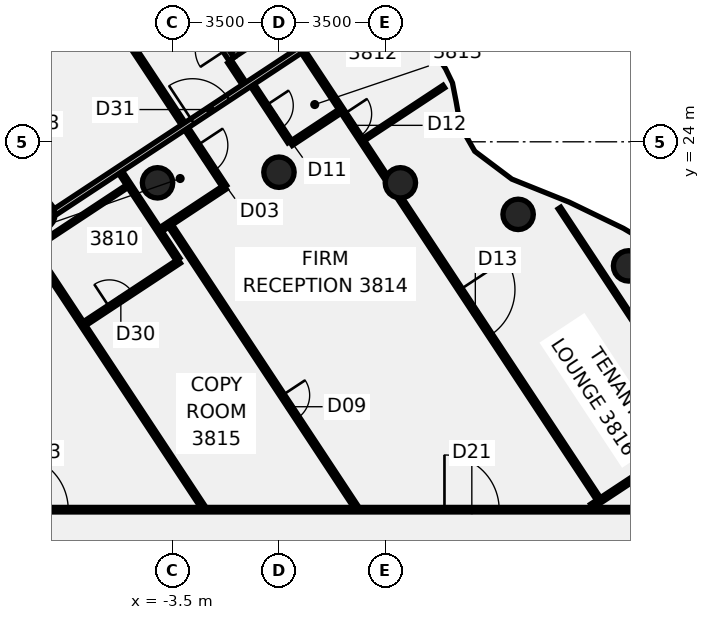
"""IFC4 building model, lengths in metres.
Left out: names, types, materials, properties, quantities, classifications, styles, units other than length and angle.
Written with IfcOpenShell. Run it as: python <this file> out.ifc"""

import sys

from ifc_helpers import new_model, si_unit, direction, frame, frame_2d, origin, origin_2d, place, context, subcontext, project, spatial, rectangle, circle, extrude, element, fill, save


model = new_model("IFC4")
c1 = context("Model", 3, precision=1e-05, world=origin(), true_north=direction((0.0, 1.0)))
c2 = subcontext(c1, "Body", "Model", "MODEL_VIEW")
j1 = project(units=[si_unit("LENGTHUNIT", "METRE"), si_unit("PLANEANGLEUNIT", "RADIAN")], contexts=[c1])
p1 = place(None, origin())
s1 = spatial("IfcSite", under=j1, at=p1, CompositionType="ELEMENT")
p2 = place(p1, origin())
s2 = spatial("IfcBuilding", under=s1, at=p2, CompositionType="ELEMENT")
p3 = place(p2, frame((0.0, 0.0, 155.5)))
s3 = spatial("IfcBuildingStorey", under=s2, at=p3, CompositionType="ELEMENT", Elevation=155.5)
for number, where, z_axis, x_axis in (
    (1, (11.5, 19.919, -0.14), (0.0, 0.0, 1.0), (1.0, 0.0, 0.0)),
    (2, (7.866, 21.613, -0.14), (0.0, 0.0, 1.0), (1.0, 0.0, 0.0)),
    (3, (3.994, 22.651, -0.14), (0.0, 0.0, 1.0), (1.0, 0.0, 0.0)),
    (4, (0.0, 23.0, -0.14), (0.0, 0.0, 1.0), (1.0, 0.0, 0.0)),
    (5, (-3.994, 22.651, -0.14), (0.0, 0.0, 1.0), (1.0, 0.0, 0.0)),
    (6, (-7.866, 21.613, -0.14), (0.0, 0.0, 1.0), (1.0, 0.0, 0.0)),
):
    element("IfcColumn", number, at=place(p3, frame(where, z_axis=z_axis, x_axis=x_axis)), inside=s3, PredefinedType="COLUMN", context=c2, shape_type="SweptSolid", body=[
        extrude(circle(Radius=0.5, at=origin_2d()), origin(), (0.0, 0.0, 1.0), 3.75),
    ])
p4 = place(p3, frame((-12.969, 39.464, 0.0), z_axis=(0.0, 0.0, 1.0), x_axis=(0.551034040248, -0.834482765842, 0.0)))
e7 = element("IfcWall", 7, at=p4, inside=s3, PredefinedType="PARTITIONING", context=c2, shape_type="SweptSolid", body=[
    extrude(rectangle(XDim=20.3, YDim=0.15, at=frame_2d((10.15, 0.0))), origin(), (0.0, 0.0, 1.0), 3.01),
])
p5 = place(p4, frame((18.67, 0.0, 0.0)))
e8 = element("IfcOpeningElement", 8, at=p5, cuts=e7, PredefinedType="OPENING", context=c2, shape_type="SweptSolid", body=[
    extrude(rectangle(XDim=1.0, YDim=2.1, at=frame_2d((0.5, 1.05))), frame((0.0, 0.085, 0.0), z_axis=(0.0, -1.0, 0.0), x_axis=(1.0, 0.0, 0.0)), (0.0, 0.0, 1.0), 0.17),
])
p6 = place(p4, frame((11.77, 0.0, 0.0)))
e9 = element("IfcOpeningElement", 9, at=p6, cuts=e7, PredefinedType="OPENING", context=c2, shape_type="SweptSolid", body=[
    extrude(rectangle(XDim=0.9, YDim=2.1, at=frame_2d((0.45, 1.05))), frame((0.0, 0.085, 0.0), z_axis=(0.0, -1.0, 0.0), x_axis=(1.0, 0.0, 0.0)), (0.0, 0.0, 1.0), 0.17),
])
p7 = place(p4, frame((5.17, 0.0, 0.0)))
e10 = element("IfcOpeningElement", 10, at=p7, cuts=e7, PredefinedType="OPENING", context=c2, shape_type="SweptSolid", body=[
    extrude(rectangle(XDim=0.9, YDim=2.1, at=frame_2d((0.45, 1.05))), frame((0.0, 0.085, 0.0), z_axis=(0.0, -1.0, 0.0), x_axis=(1.0, 0.0, 0.0)), (0.0, 0.0, 1.0), 0.17),
])
p8 = place(p3, frame((-1.622, 26.634, 0.0), z_axis=(0.0, 0.0, 1.0), x_axis=(0.551095072223, -0.83444246139, 0.0)))
e11 = element("IfcWall", 11, at=p8, inside=s3, PredefinedType="PARTITIONING", context=c2, shape_type="SweptSolid", body=[
    extrude(rectangle(XDim=0.861, YDim=0.15, at=frame_2d((0.43, 0.0))), origin(), (0.0, 0.0, 1.0), 3.01),
])
p9 = place(p3, frame((-9.884, 23.177, 0.0), z_axis=(0.0, 0.0, 1.0), x_axis=(0.550963337995, -0.834529448363, 0.0)))
e12 = element("IfcWall", 12, at=p9, inside=s3, PredefinedType="PARTITIONING", context=c2, shape_type="SweptSolid", body=[
    extrude(rectangle(XDim=13.393, YDim=0.15, at=frame_2d((6.697, 0.0))), origin(), (0.0, 0.0, 1.0), 3.01),
])
p10 = place(p3, frame((-5.21, 22.995, 0.0), z_axis=(0.0, 0.0, 1.0), x_axis=(0.550928577868, -0.834552396251, 0.0)))
e13 = element("IfcWall", 13, at=p10, inside=s3, PredefinedType="PARTITIONING", context=c2, shape_type="SweptSolid", body=[
    extrude(rectangle(XDim=3.426, YDim=0.15, at=frame_2d((1.713, 0.0))), origin(), (0.0, 0.0, 1.0), 3.01),
])
p11 = place(p3, frame((-3.565, 21.228, 0.0), z_axis=(0.0, 0.0, 1.0), x_axis=(0.55097538213, -0.834521496599, 0.0)))
e14 = element("IfcWall", 14, at=p11, inside=s3, PredefinedType="PARTITIONING", context=c2, shape_type="SweptSolid", body=[
    extrude(rectangle(XDim=11.058, YDim=0.15, at=frame_2d((5.529, 0.0))), origin(), (0.0, 0.0, 1.0), 3.01),
])
p12 = place(p11, frame((6.67, 0.0, 0.0)))
e15 = element("IfcOpeningElement", 15, at=p12, cuts=e14, PredefinedType="OPENING", context=c2, shape_type="SweptSolid", body=[
    extrude(rectangle(XDim=0.9, YDim=2.1, at=frame_2d((0.45, 1.05))), frame((0.0, 0.085, 0.0), z_axis=(0.0, -1.0, 0.0), x_axis=(1.0, 0.0, 0.0)), (0.0, 0.0, 1.0), 0.17),
])
p13 = place(p3, frame((-0.867, 25.855, 0.0), z_axis=(0.0, 0.0, 1.0), x_axis=(0.550802281657, -0.834635756795, 0.0)))
e16 = element("IfcWall", 16, at=p13, inside=s3, PredefinedType="PARTITIONING", context=c2, shape_type="SweptSolid", body=[
    extrude(rectangle(XDim=2.215, YDim=0.15, at=frame_2d((1.107, 0.0))), origin(), (0.0, 0.0, 1.0), 3.01),
])
p14 = place(p13, frame((0.795, 0.0, 0.0)))
e17 = element("IfcOpeningElement", 17, at=p14, cuts=e16, PredefinedType="OPENING", context=c2, shape_type="SweptSolid", body=[
    extrude(rectangle(XDim=0.9, YDim=2.1, at=frame_2d((0.45, 1.05))), frame((0.0, 0.085, 0.0), z_axis=(0.0, -1.0, 0.0), x_axis=(1.0, 0.0, 0.0)), (0.0, 0.0, 1.0), 0.17),
])
p15 = place(p3, frame((0.799, 26.961, 0.0), z_axis=(0.0, 0.0, 1.0), x_axis=(0.55102221272, -0.834490575794, 0.0)))
e18 = element("IfcWall", 18, at=p15, inside=s3, PredefinedType="PARTITIONING", context=c2, shape_type="SweptSolid", body=[
    extrude(rectangle(XDim=5.139, YDim=0.15, at=frame_2d((2.57, 0.0))), origin(), (0.0, 0.0, 1.0), 3.01),
])
p16 = place(p15, frame((2.449, 0.0, 0.0)))
e19 = element("IfcOpeningElement", 19, at=p16, cuts=e18, PredefinedType="OPENING", context=c2, shape_type="SweptSolid", body=[
    extrude(rectangle(XDim=0.9, YDim=2.1, at=frame_2d((0.45, 1.05))), frame((0.0, 0.085, 0.0), z_axis=(0.0, -1.0, 0.0), x_axis=(1.0, 0.0, 0.0)), (0.0, 0.0, 1.0), 0.17),
])
p17 = place(p3, frame((3.879, 22.297, 0.0), z_axis=(0.0, 0.0, 1.0), x_axis=(0.551037271507, -0.834480632136, 0.0)))
e20 = element("IfcWall", 20, at=p17, inside=s3, PredefinedType="PARTITIONING", context=c2, shape_type="SweptSolid", body=[
    extrude(rectangle(XDim=12.03, YDim=0.15, at=frame_2d((6.015, 0.0))), origin(), (0.0, 0.0, 1.0), 3.01),
])
p18 = place(p17, frame((3.782, 0.0, 0.0)))
e21 = element("IfcOpeningElement", 21, at=p18, cuts=e20, PredefinedType="OPENING", context=c2, shape_type="SweptSolid", body=[
    extrude(rectangle(XDim=1.8, YDim=2.1, at=frame_2d((0.9, 1.05))), frame((0.0, 0.085, 0.0), z_axis=(0.0, -1.0, 0.0), x_axis=(1.0, 0.0, 0.0)), (0.0, 0.0, 1.0), 0.17),
])
p19 = place(p3, frame((9.226, 21.82, 0.0), z_axis=(0.0, 0.0, 1.0), x_axis=(0.550974071804, -0.834522361713, 0.0)))
e22 = element("IfcWall", 22, at=p19, inside=s3, PredefinedType="PARTITIONING", context=c2, shape_type="SweptSolid", body=[
    extrude(rectangle(XDim=8.692, YDim=0.1, at=frame_2d((4.346, 0.0))), origin(), (0.0, 0.0, 1.0), 3.01),
])
p20 = place(p3, frame((-17.065, 11.9, 0.0), z_axis=(0.0, 0.0, 1.0), x_axis=(1.0, 0.0, 0.0)))
e23 = element("IfcWall", 23, at=p20, inside=s3, PredefinedType="PARTITIONING", context=c2, shape_type="SweptSolid", body=[
    extrude(rectangle(XDim=34.165, YDim=0.15, at=frame_2d((17.083, 0.0))), origin(), (0.0, 0.0, 1.0), 3.01),
])
p21 = place(p20, frame((22.509, 0.0, 0.0)))
e24 = element("IfcOpeningElement", 24, at=p21, cuts=e23, PredefinedType="OPENING", context=c2, shape_type="SweptSolid", body=[
    extrude(rectangle(XDim=1.8, YDim=2.1, at=frame_2d((0.9, 1.05))), frame((0.0, 0.085, 0.0), z_axis=(0.0, -1.0, 0.0), x_axis=(1.0, 0.0, 0.0)), (0.0, 0.0, 1.0), 0.17),
])
p22 = place(p20, frame((30.477, 0.0, 0.0)))
e25 = element("IfcOpeningElement", 25, at=p22, cuts=e23, PredefinedType="OPENING", context=c2, shape_type="SweptSolid", body=[
    extrude(rectangle(XDim=1.8, YDim=2.1, at=frame_2d((0.9, 1.05))), frame((0.0, 0.085, 0.0), z_axis=(0.0, -1.0, 0.0), x_axis=(1.0, 0.0, 0.0)), (0.0, 0.0, 1.0), 0.17),
])
p23 = place(p20, frame((8.334, 0.0, 0.0)))
e26 = element("IfcOpeningElement", 26, at=p23, cuts=e23, PredefinedType="OPENING", context=c2, shape_type="SweptSolid", body=[
    extrude(rectangle(XDim=1.8, YDim=2.1, at=frame_2d((0.9, 1.05))), frame((0.0, 0.085, 0.0), z_axis=(0.0, -1.0, 0.0), x_axis=(1.0, 0.0, 0.0)), (0.0, 0.0, 1.0), 0.17),
])
p24 = place(p3, frame((-8.042, 20.524, 0.0), z_axis=(0.0, 0.0, 1.0), x_axis=(0.834491304173, 0.551021109632, 0.0)))
e27 = element("IfcWall", 27, at=p24, inside=s3, PredefinedType="PARTITIONING", context=c2, shape_type="SweptSolid", body=[
    extrude(rectangle(XDim=3.65, YDim=0.1, at=frame_2d((1.825, 0.0))), origin(), (0.0, 0.0, 1.0), 3.01),
])
p25 = place(p3, frame((-6.386, 18.024, 0.0), z_axis=(0.0, 0.0, 1.0), x_axis=(0.83468603123, 0.550726092781, 0.0)))
e28 = element("IfcWall", 28, at=p25, inside=s3, PredefinedType="PARTITIONING", context=c2, shape_type="SweptSolid", body=[
    extrude(rectangle(XDim=3.72, YDim=0.15, at=frame_2d((1.86, 0.0))), origin(), (0.0, 0.0, 1.0), 3.01),
])
p26 = place(p25, frame((0.97, 0.0, 0.0)))
e29 = element("IfcOpeningElement", 29, at=p26, cuts=e28, PredefinedType="OPENING", context=c2, shape_type="SweptSolid", body=[
    extrude(rectangle(XDim=0.9, YDim=2.1, at=frame_2d((0.45, 1.05))), frame((0.0, 0.085, 0.0), z_axis=(0.0, -1.0, 0.0), x_axis=(1.0, 0.0, 0.0)), (0.0, 0.0, 1.0), 0.17),
])
p27 = place(p3, frame((2.795, 24.082, 0.0), z_axis=(0.0, 0.0, 1.0), x_axis=(0.83472341034, 0.550669436441, 0.0)))
e30 = element("IfcWall", 30, at=p27, inside=s3, PredefinedType="PARTITIONING", context=c2, shape_type="SweptSolid", body=[
    extrude(rectangle(XDim=3.15, YDim=0.1, at=frame_2d((1.575, 0.0))), origin(), (0.0, 0.0, 1.0), 3.01),
])
p28 = place(p3, frame((-7.567, 21.559, 0.0), z_axis=(0.0, 0.0, 1.0), x_axis=(0.834644793963, 0.55078858731, 0.0)))
e31 = element("IfcWall", 31, at=p28, inside=s3, PredefinedType="PARTITIONING", context=c2, shape_type="SweptSolid", body=[
    extrude(rectangle(XDim=13.257, YDim=0.2, at=frame_2d((6.629, 0.0))), origin(), (0.0, 0.0, 1.0), 3.01),
])
p29 = place(p28, frame((5.658, 0.0, 0.0)))
e32 = element("IfcOpeningElement", 32, at=p29, cuts=e31, PredefinedType="OPENING", context=c2, shape_type="SweptSolid", body=[
    extrude(rectangle(XDim=1.4, YDim=2.1, at=frame_2d((0.7, 1.05))), frame((0.0, 0.11, 0.0), z_axis=(0.0, -1.0, 0.0), x_axis=(1.0, 0.0, 0.0)), (0.0, 0.0, 1.0), 0.22),
])
p30 = place(p3, frame((-3.875, 21.119, 0.0), z_axis=(0.0, 0.0, 1.0), x_axis=(0.834339300492, 0.551251241863, 0.0)))
e33 = element("IfcWall", 33, at=p30, inside=s3, PredefinedType="PARTITIONING", context=c2, shape_type="SweptSolid", body=[
    extrude(rectangle(XDim=2.519, YDim=0.15, at=frame_2d((1.26, 0.0))), origin(), (0.0, 0.0, 1.0), 3.01),
])
p31 = place(p3, frame((0.396, 23.941, 0.0), z_axis=(0.0, 0.0, 1.0), x_axis=(0.834370825501, 0.551203524619, 0.0)))
e34 = element("IfcWall", 34, at=p31, inside=s3, PredefinedType="PARTITIONING", context=c2, shape_type="SweptSolid", body=[
    extrude(rectangle(XDim=1.92, YDim=0.15, at=frame_2d((0.96, 0.0))), origin(), (0.0, 0.0, 1.0), 3.01),
])
p32 = place(p3, frame((10.292, 12.019, 0.0), z_axis=(0.0, 0.0, 1.0), x_axis=(0.834523303169, 0.550972645844, 0.0)))
e35 = element("IfcWall", 35, at=p32, inside=s3, PredefinedType="PARTITIONING", context=c2, shape_type="SweptSolid", body=[
    extrude(rectangle(XDim=4.511, YDim=0.15, at=frame_2d((2.255, 0.0))), origin(), (0.0, 0.0, 1.0), 3.01),
])
p33 = place(p3, frame((-1.56, 26.722, -0.14), z_axis=(0.0, 0.0, 1.0), x_axis=(-0.550960993184, 0.834530996422, 0.0)))
e36 = element("IfcWall", 36, at=p33, inside=s3, PredefinedType="SHEAR", context=c2, shape_type="SweptSolid", body=[
    extrude(rectangle(XDim=6.7, YDim=0.2, at=frame_2d((3.35, 0.0))), origin(), (0.0, 0.0, 1.0), 3.15),
])
p34 = place(p33, frame((0.35, 0.0, 0.0)))
e37 = element("IfcOpeningElement", 37, at=p34, cuts=e36, PredefinedType="OPENING", context=c2, shape_type="SweptSolid", body=[
    extrude(rectangle(XDim=1.0, YDim=2.1, at=frame_2d((0.5, 1.05))), frame((0.0, 0.11, 0.0), z_axis=(0.0, -1.0, 0.0), x_axis=(1.0, 0.0, 0.0)), (0.0, 0.0, 1.0), 0.22),
])
p35 = place(p3, frame((1.139, 28.624, -0.14), z_axis=(0.0, 0.0, 1.0), x_axis=(-0.834565209838, -0.550909167222, 0.0)))
e38 = element("IfcWall", 38, at=p35, inside=s3, PredefinedType="SHEAR", context=c2, shape_type="SweptSolid", body=[
    extrude(rectangle(XDim=3.2, YDim=0.2, at=frame_2d((1.6, 0.0))), origin(), (0.0, 0.0, 1.0), 3.15),
])
p36 = place(p5, frame((1.0, 0.0, 0.0), z_axis=(0.0, 0.0, 1.0), x_axis=(-1.0, 0.0, 0.0)))
e39 = element("IfcDoor", 39, at=p36, inside=s3, OperationType="SINGLE_SWING_RIGHT", PredefinedType="DOOR", context=c2, shape_type="SweptSolid", body=[
    extrude(rectangle(XDim=1.0, YDim=2.1, at=frame_2d((0.5, 1.05))), frame((0.0, 0.025, 0.0), z_axis=(0.0, -1.0, 0.0), x_axis=(1.0, 0.0, 0.0)), (0.0, 0.0, 1.0), 0.05),
])
fill(e8, e39)
p37 = place(p12, frame((0.9, 0.0, 0.0), z_axis=(0.0, 0.0, 1.0), x_axis=(-1.0, 0.0, 0.0)))
e40 = element("IfcDoor", 40, at=p37, inside=s3, OperationType="SINGLE_SWING_RIGHT", PredefinedType="DOOR", context=c2, shape_type="SweptSolid", body=[
    extrude(rectangle(XDim=0.9, YDim=2.1, at=frame_2d((0.45, 1.05))), frame((0.0, 0.025, 0.0), z_axis=(0.0, -1.0, 0.0), x_axis=(1.0, 0.0, 0.0)), (0.0, 0.0, 1.0), 0.05),
])
fill(e15, e40)
p38 = place(p14, origin())
e41 = element("IfcDoor", 41, at=p38, inside=s3, OperationType="SINGLE_SWING_LEFT", PredefinedType="DOOR", context=c2, shape_type="SweptSolid", body=[
    extrude(rectangle(XDim=0.9, YDim=2.1, at=frame_2d((0.45, 1.05))), frame((0.0, 0.025, 0.0), z_axis=(0.0, -1.0, 0.0), x_axis=(1.0, 0.0, 0.0)), (0.0, 0.0, 1.0), 0.05),
])
fill(e17, e41)
p39 = place(p16, origin())
e42 = element("IfcDoor", 42, at=p39, inside=s3, OperationType="SINGLE_SWING_LEFT", PredefinedType="DOOR", context=c2, shape_type="SweptSolid", body=[
    extrude(rectangle(XDim=0.9, YDim=2.1, at=frame_2d((0.45, 1.05))), frame((0.0, 0.025, 0.0), z_axis=(0.0, -1.0, 0.0), x_axis=(1.0, 0.0, 0.0)), (0.0, 0.0, 1.0), 0.05),
])
fill(e19, e42)
p40 = place(p18, origin())
e43 = element("IfcDoor", 43, at=p40, inside=s3, OperationType="DOUBLE_DOOR_SINGLE_SWING", PredefinedType="DOOR", context=c2, shape_type="SweptSolid", body=[
    extrude(rectangle(XDim=1.8, YDim=2.1, at=frame_2d((0.9, 1.05))), frame((0.0, 0.025, 0.0), z_axis=(0.0, -1.0, 0.0), x_axis=(1.0, 0.0, 0.0)), (0.0, 0.0, 1.0), 0.05),
])
fill(e21, e43)
p41 = place(p21, frame((1.8, 0.0, 0.0), z_axis=(0.0, 0.0, 1.0), x_axis=(-1.0, 0.0, 0.0)))
e44 = element("IfcDoor", 44, at=p41, inside=s3, OperationType="DOUBLE_DOOR_SINGLE_SWING", PredefinedType="DOOR", context=c2, shape_type="SweptSolid", body=[
    extrude(rectangle(XDim=1.8, YDim=2.1, at=frame_2d((0.9, 1.05))), frame((0.0, 0.025, 0.0), z_axis=(0.0, -1.0, 0.0), x_axis=(1.0, 0.0, 0.0)), (0.0, 0.0, 1.0), 0.05),
])
fill(e24, e44)
p42 = place(p23, frame((1.8, 0.0, 0.0), z_axis=(0.0, 0.0, 1.0), x_axis=(-1.0, 0.0, 0.0)))
e45 = element("IfcDoor", 45, at=p42, inside=s3, OperationType="DOUBLE_DOOR_SINGLE_SWING", PredefinedType="DOOR", context=c2, shape_type="SweptSolid", body=[
    extrude(rectangle(XDim=1.8, YDim=2.1, at=frame_2d((0.9, 1.05))), frame((0.0, 0.025, 0.0), z_axis=(0.0, -1.0, 0.0), x_axis=(1.0, 0.0, 0.0)), (0.0, 0.0, 1.0), 0.05),
])
fill(e26, e45)
p43 = place(p26, origin())
e46 = element("IfcDoor", 46, at=p43, inside=s3, OperationType="SINGLE_SWING_RIGHT", PredefinedType="DOOR", context=c2, shape_type="SweptSolid", body=[
    extrude(rectangle(XDim=0.9, YDim=2.1, at=frame_2d((0.45, 1.05))), frame((0.0, 0.025, 0.0), z_axis=(0.0, -1.0, 0.0), x_axis=(1.0, 0.0, 0.0)), (0.0, 0.0, 1.0), 0.05),
])
fill(e29, e46)
p44 = place(p29, frame((1.4, 0.0, 0.0), z_axis=(0.0, 0.0, 1.0), x_axis=(-1.0, 0.0, 0.0)))
e47 = element("IfcDoor", 47, at=p44, inside=s3, OperationType="DOUBLE_DOOR_SINGLE_SWING", PredefinedType="DOOR", context=c2, shape_type="SweptSolid", body=[
    extrude(rectangle(XDim=1.4, YDim=2.1, at=frame_2d((0.7, 1.05))), frame((0.0, 0.025, 0.0), z_axis=(0.0, -1.0, 0.0), x_axis=(1.0, 0.0, 0.0)), (0.0, 0.0, 1.0), 0.05),
])
fill(e32, e47)
save(model, sys.argv[1])
